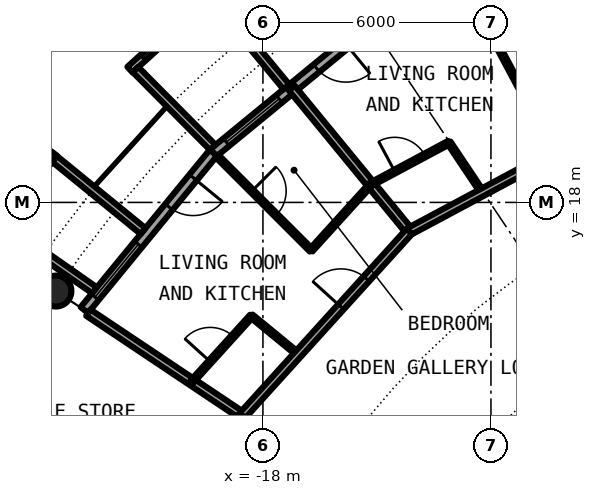
"""IFC4 building model, lengths in metres.
Left out: names, types, materials, properties, quantities, classifications, styles, units other than length and angle.
Written with IfcOpenShell. Run it as: python <this file> out.ifc"""

import sys

from ifc_helpers import new_model, si_unit, direction, frame, frame_2d, origin, origin_2d, place, context, subcontext, project, spatial, rectangle, circle, hollow_circle, extrude, element, fill, save


model = new_model("IFC4")
c1 = context("Model", 3, precision=1e-05, world=origin(), true_north=direction((0.0, 1.0)))
c2 = subcontext(c1, "Body", "Model", "MODEL_VIEW")
j1 = project(units=[si_unit("LENGTHUNIT", "METRE"), si_unit("PLANEANGLEUNIT", "RADIAN")], contexts=[c1])
p1 = place(None, origin())
s1 = spatial("IfcSite", under=j1, at=p1, CompositionType="ELEMENT")
p2 = place(p1, origin())
s2 = spatial("IfcBuilding", under=s1, at=p2, CompositionType="ELEMENT")
p3 = place(p2, frame((0.0, 0.0, 218.8)))
s3 = spatial("IfcBuildingStorey", under=s2, at=p3, CompositionType="ELEMENT", Elevation=218.8)
p4 = place(p3, frame((-23.448, 15.667, 0.0), z_axis=(0.0, 0.0, 1.0), x_axis=(1.0, 0.0, 0.0)))
e1 = element("IfcColumn", 1, at=p4, inside=s3, PredefinedType="COLUMN", context=c2, shape_type="SweptSolid", body=[
    extrude(hollow_circle(Radius=0.406, WallThickness=0.03, at=origin_2d()), origin(), (0.0, 0.0, 1.0), 3.05),
])
p5 = place(p3, frame((-15.167, 22.699, 0.0), z_axis=(0.0, 0.0, 1.0), x_axis=(-0.773019449054, -0.634382322723, 0.0)))
e2 = element("IfcWall", 2, at=p5, inside=s3, PredefinedType="SOLIDWALL", context=c2, shape_type="SweptSolid", body=[
    extrude(rectangle(XDim=5.352, YDim=0.25, at=frame_2d((2.676, 0.0))), origin(), (0.0, 0.0, 1.0), 2.65),
])
p6 = place(p5, frame((0.841, 0.0, 0.0)))
e3 = element("IfcOpeningElement", 3, at=p6, cuts=e2, PredefinedType="OPENING", context=c2, shape_type="SweptSolid", body=[
    extrude(rectangle(XDim=1.0, YDim=2.2, at=frame_2d((0.5, 1.1))), frame((0.0, 0.135, 0.0), z_axis=(0.0, -1.0, 0.0), x_axis=(1.0, 0.0, 0.0)), (0.0, 0.0, 1.0), 0.27),
])
p7 = place(p5, frame((3.111, 0.0, 0.3)))
e4 = element("IfcOpeningElement", 4, at=p7, cuts=e2, PredefinedType="OPENING", context=c2, shape_type="SweptSolid", body=[
    extrude(rectangle(XDim=1.8, YDim=2.1, at=frame_2d((0.9, 1.05))), frame((0.0, 0.135, 0.0), z_axis=(0.0, -1.0, 0.0), x_axis=(1.0, 0.0, 0.0)), (0.0, 0.0, 1.0), 0.27),
])
p8 = place(p3, frame((-19.282, 23.503, -0.03), z_axis=(0.0, 0.0, 1.0), x_axis=(-0.740998365753, -0.671506829416, 0.0)))
e5 = element("IfcWall", 5, at=p8, inside=s3, PredefinedType="SOLIDWALL", context=c2, shape_type="SweptSolid", body=[
    extrude(rectangle(XDim=2.993, YDim=0.2, at=frame_2d((1.497, 0.0))), origin(), (0.0, 0.0, 1.0), 2.68),
])
p9 = place(p8, frame((0.457, 0.0, 0.33)))
e6 = element("IfcOpeningElement", 6, at=p9, cuts=e5, PredefinedType="OPENING", context=c2, shape_type="SweptSolid", body=[
    extrude(circle(Radius=1.04, at=frame_2d((1.04, 1.04))), frame((0.0, 0.11, 0.0), z_axis=(0.0, -1.0, 0.0), x_axis=(1.0, 0.0, 0.0)), (0.0, 0.0, 1.0), 0.22),
])
p10 = place(p3, frame((-17.384, 21.041, -0.03), z_axis=(0.0, 0.0, 1.0), x_axis=(-0.63709551667, 0.770784861449, 0.0)))
e7 = element("IfcWall", 7, at=p10, inside=s3, PredefinedType="SOLIDWALL", context=c2, shape_type="SweptSolid", body=[
    extrude(rectangle(XDim=3.006, YDim=0.2, at=frame_2d((1.503, 0.0))), origin(), (0.0, 0.0, 1.0), 2.68),
])
p11 = place(p3, frame((-19.323, 19.45, -0.03), z_axis=(0.0, 0.0, 1.0), x_axis=(-0.704476739375, 0.709727076896, 0.0)))
e8 = element("IfcWall", 8, at=p11, inside=s3, PredefinedType="SOLIDWALL", context=c2, shape_type="SweptSolid", body=[
    extrude(rectangle(XDim=2.883, YDim=0.2, at=frame_2d((1.441, 0.0))), origin(), (0.0, 0.0, 1.0), 2.68),
])
p12 = place(p3, frame((-19.304, 19.304, 0.0), z_axis=(0.0, 0.0, 1.0), x_axis=(-0.634382322723, -0.773019449054, 0.0)))
e9 = element("IfcWall", 9, at=p12, inside=s3, PredefinedType="SOLIDWALL", context=c2, shape_type="SweptSolid", body=[
    extrude(rectangle(XDim=5.352, YDim=0.25, at=frame_2d((2.676, 0.0))), origin(), (0.0, 0.0, 1.0), 2.65),
])
p13 = place(p12, frame((0.841, 0.0, 0.0)))
e10 = element("IfcOpeningElement", 10, at=p13, cuts=e9, PredefinedType="OPENING", context=c2, shape_type="SweptSolid", body=[
    extrude(rectangle(XDim=1.0, YDim=2.2, at=frame_2d((0.5, 1.1))), frame((0.0, 0.135, 0.0), z_axis=(0.0, -1.0, 0.0), x_axis=(1.0, 0.0, 0.0)), (0.0, 0.0, 1.0), 0.27),
])
p14 = place(p12, frame((3.111, 0.0, 0.3)))
e11 = element("IfcOpeningElement", 11, at=p14, cuts=e9, PredefinedType="OPENING", context=c2, shape_type="SweptSolid", body=[
    extrude(rectangle(XDim=1.8, YDim=2.1, at=frame_2d((0.9, 1.05))), frame((0.0, 0.135, 0.0), z_axis=(0.0, -1.0, 0.0), x_axis=(1.0, 0.0, 0.0)), (0.0, 0.0, 1.0), 0.27),
])
p15 = place(p3, frame((-23.497, 19.289, -0.03), z_axis=(0.0, 0.0, 1.0), x_axis=(-0.602806268067, -0.797887588059, 0.0)))
e12 = element("IfcWall", 12, at=p15, inside=s3, PredefinedType="SOLIDWALL", context=c2, shape_type="SweptSolid", body=[
    extrude(rectangle(XDim=2.447, YDim=0.2, at=frame_2d((1.223, 0.0))), origin(), (0.0, 0.0, 1.0), 2.68),
])
p16 = place(p15, frame((0.183, 0.0, 0.33)))
e13 = element("IfcOpeningElement", 13, at=p16, cuts=e12, PredefinedType="OPENING", context=c2, shape_type="SweptSolid", body=[
    extrude(circle(Radius=1.04, at=frame_2d((1.04, 1.04))), frame((0.0, 0.11, 0.0), z_axis=(0.0, -1.0, 0.0), x_axis=(1.0, 0.0, 0.0)), (0.0, 0.0, 1.0), 0.22),
])
p17 = place(p3, frame((-21.155, 17.246, -0.03), z_axis=(0.0, 0.0, 1.0), x_axis=(-0.775179004516, 0.631741648902, 0.0)))
e14 = element("IfcWall", 14, at=p17, inside=s3, PredefinedType="SOLIDWALL", context=c2, shape_type="SweptSolid", body=[
    extrude(rectangle(XDim=3.006, YDim=0.2, at=frame_2d((1.503, 0.0))), origin(), (0.0, 0.0, 1.0), 2.68),
])
p18 = place(p3, frame((-22.433, 15.688, -0.03), z_axis=(0.0, 0.0, 1.0), x_axis=(-0.819373043115, 0.573260687834, 0.0)))
e15 = element("IfcWall", 15, at=p18, inside=s3, PredefinedType="SOLIDWALL", context=c2, shape_type="SweptSolid", body=[
    extrude(rectangle(XDim=2.925, YDim=0.2, at=frame_2d((1.463, 0.0))), origin(), (0.0, 0.0, 1.0), 2.68),
])
p19 = place(p3, frame((-22.595, 15.098, 0.0), z_axis=(0.0, 0.0, 1.0), x_axis=(0.831387096605, -0.55569370664, 0.0)))
e16 = element("IfcWall", 16, at=p19, inside=s3, PredefinedType="PARTITIONING", context=c2, shape_type="SweptSolid", body=[
    extrude(rectangle(XDim=4.875, YDim=0.2, at=frame_2d((2.438, 0.0))), origin(), (0.0, 0.0, 1.0), 2.65),
])
p20 = place(p3, frame((-19.21, 19.222, 0.0), z_axis=(0.0, 0.0, 1.0), x_axis=(0.706967463531, -0.707246071398, 0.0)))
e17 = element("IfcWall", 17, at=p20, inside=s3, PredefinedType="PARTITIONING", context=c2, shape_type="SweptSolid", body=[
    extrude(rectangle(XDim=3.505, YDim=0.1, at=frame_2d((1.752, 0.0))), origin(), (0.0, 0.0, 1.0), 2.65),
])
p21 = place(p20, frame((1.303, 0.0, 0.0)))
e18 = element("IfcOpeningElement", 18, at=p21, cuts=e17, PredefinedType="OPENING", context=c2, shape_type="SweptSolid", body=[
    extrude(rectangle(XDim=0.9, YDim=2.3, at=frame_2d((0.45, 1.15))), frame((0.0, 0.06, 0.0), z_axis=(0.0, -1.0, 0.0), x_axis=(1.0, 0.0, 0.0)), (0.0, 0.0, 1.0), 0.12),
])
p22 = place(p3, frame((-17.24, 21.007, 0.0), z_axis=(0.0, 0.0, 1.0), x_axis=(0.634374159378, -0.773026148273, 0.0)))
e19 = element("IfcWall", 19, at=p22, inside=s3, PredefinedType="PARTITIONING", context=c2, shape_type="SweptSolid", body=[
    extrude(rectangle(XDim=4.876, YDim=0.2, at=frame_2d((2.438, 0.0))), origin(), (0.0, 0.0, 1.0), 2.65),
])
p23 = place(p3, frame((-13.106, 19.574, 0.0), z_axis=(0.0, 0.0, 1.0), x_axis=(0.556271671389, -0.83100049796, 0.0)))
e20 = element("IfcWall", 20, at=p23, inside=s3, PredefinedType="PARTITIONING", context=c2, shape_type="SweptSolid", body=[
    extrude(rectangle(XDim=1.576, YDim=0.1, at=frame_2d((0.788, 0.0))), origin(), (0.0, 0.0, 1.0), 2.65),
])
p24 = place(p3, frame((-12.81, 23.966, 0.0), z_axis=(0.0, 0.0, 1.0), x_axis=(0.471372010014, -0.881934480659, 0.0)))
e21 = element("IfcWall", 21, at=p24, inside=s3, PredefinedType="PARTITIONING", context=c2, shape_type="SweptSolid", body=[
    extrude(rectangle(XDim=3.734, YDim=0.1, at=frame_2d((1.867, 0.0))), origin(), (0.0, 0.0, 1.0), 2.65),
])
p25 = place(p24, frame((1.417, 0.0, 0.0)))
e22 = element("IfcOpeningElement", 22, at=p25, cuts=e21, PredefinedType="OPENING", context=c2, shape_type="SweptSolid", body=[
    extrude(rectangle(XDim=0.9, YDim=2.3, at=frame_2d((0.45, 1.15))), frame((0.0, 0.06, 0.0), z_axis=(0.0, -1.0, 0.0), x_axis=(1.0, 0.0, 0.0)), (0.0, 0.0, 1.0), 0.12),
])
p26 = place(p3, frame((-18.302, 15.01, 0.0), z_axis=(0.0, 0.0, 1.0), x_axis=(0.773476341377, -0.633825172528, 0.0)))
e23 = element("IfcWall", 23, at=p26, inside=s3, PredefinedType="PARTITIONING", context=c2, shape_type="SweptSolid", body=[
    extrude(rectangle(XDim=1.584, YDim=0.1, at=frame_2d((0.792, 0.0))), origin(), (0.0, 0.0, 1.0), 2.65),
])
p27 = place(p3, frame((-14.718, 9.832, 0.0), z_axis=(0.0, 0.0, 1.0), x_axis=(0.831437137577, 0.555618831806, 0.0)))
e24 = element("IfcWall", 24, at=p27, inside=s3, PredefinedType="PARTITIONING", context=c2, shape_type="SweptSolid", body=[
    extrude(rectangle(XDim=13.549, YDim=0.2, at=frame_2d((6.774, 0.0))), origin(), (0.0, 0.0, 1.0), 2.65),
])
p28 = place(p27, frame((7.968, 0.0, 0.0)))
e25 = element("IfcOpeningElement", 25, at=p28, cuts=e24, PredefinedType="OPENING", context=c2, shape_type="SweptSolid", body=[
    extrude(rectangle(XDim=1.0, YDim=2.3, at=frame_2d((0.5, 1.15))), frame((0.0, 0.11, 0.0), z_axis=(0.0, -1.0, 0.0), x_axis=(1.0, 0.0, 0.0)), (0.0, 0.0, 1.0), 0.22),
])
p29 = place(p3, frame((-14.147, 17.238, 0.0), z_axis=(0.0, 0.0, 1.0), x_axis=(0.881912965532, 0.471412262491, 0.0)))
e26 = element("IfcWall", 26, at=p29, inside=s3, PredefinedType="PARTITIONING", context=c2, shape_type="SweptSolid", body=[
    extrude(rectangle(XDim=8.702, YDim=0.2, at=frame_2d((4.351, 0.0))), origin(), (0.0, 0.0, 1.0), 2.65),
])
p30 = place(p29, frame((4.937, 0.0, 0.0)))
e27 = element("IfcOpeningElement", 27, at=p30, cuts=e26, PredefinedType="OPENING", context=c2, shape_type="SweptSolid", body=[
    extrude(rectangle(XDim=1.0, YDim=2.3, at=frame_2d((0.5, 1.15))), frame((0.0, 0.11, 0.0), z_axis=(0.0, -1.0, 0.0), x_axis=(1.0, 0.0, 0.0)), (0.0, 0.0, 1.0), 0.22),
])
p31 = place(p3, frame((-18.542, 12.389, 0.0), z_axis=(0.0, 0.0, 1.0), x_axis=(0.671561669125, 0.740948665268, 0.0)))
e28 = element("IfcWall", 28, at=p31, inside=s3, PredefinedType="PARTITIONING", context=c2, shape_type="SweptSolid", body=[
    extrude(rectangle(XDim=6.544, YDim=0.2, at=frame_2d((3.272, 0.0))), origin(), (0.0, 0.0, 1.0), 2.65),
])
p32 = place(p31, frame((3.862, 0.0, 0.0)))
e29 = element("IfcOpeningElement", 29, at=p32, cuts=e28, PredefinedType="OPENING", context=c2, shape_type="SweptSolid", body=[
    extrude(rectangle(XDim=1.0, YDim=2.3, at=frame_2d((0.5, 1.15))), frame((0.0, 0.11, 0.0), z_axis=(0.0, -1.0, 0.0), x_axis=(1.0, 0.0, 0.0)), (0.0, 0.0, 1.0), 0.22),
])
p33 = place(p3, frame((-19.317, 10.915, 0.0), z_axis=(0.0, 0.0, 1.0), x_axis=(0.465359652486, 0.885121683068, 0.0)))
e30 = element("IfcWall", 30, at=p33, inside=s3, PredefinedType="PARTITIONING", context=c2, shape_type="SweptSolid", body=[
    extrude(rectangle(XDim=1.665, YDim=0.2, at=frame_2d((0.833, 0.0))), origin(), (0.0, 0.0, 1.0), 2.65),
])
p34 = place(p3, frame((-15.162, 18.475, 0.0), z_axis=(0.0, 0.0, 1.0), x_axis=(0.881949682246, 0.471343566824, 0.0)))
e31 = element("IfcWall", 31, at=p34, inside=s3, PredefinedType="PARTITIONING", context=c2, shape_type="SweptSolid", body=[
    extrude(rectangle(XDim=2.331, YDim=0.1, at=frame_2d((1.166, 0.0))), origin(), (0.0, 0.0, 1.0), 2.65),
])
p35 = place(p34, frame((0.716, 0.0, 0.0)))
e32 = element("IfcOpeningElement", 32, at=p35, cuts=e31, PredefinedType="OPENING", context=c2, shape_type="SweptSolid", body=[
    extrude(rectangle(XDim=0.9, YDim=2.3, at=frame_2d((0.45, 1.15))), frame((0.0, 0.06, 0.0), z_axis=(0.0, -1.0, 0.0), x_axis=(1.0, 0.0, 0.0)), (0.0, 0.0, 1.0), 0.12),
])
p36 = place(p3, frame((-19.872, 13.278, 0.0), z_axis=(0.0, 0.0, 1.0), x_axis=(0.671637685376, 0.740879760544, 0.0)))
e33 = element("IfcWall", 33, at=p36, inside=s3, PredefinedType="PARTITIONING", context=c2, shape_type="SweptSolid", body=[
    extrude(rectangle(XDim=2.338, YDim=0.1, at=frame_2d((1.169, 0.0))), origin(), (0.0, 0.0, 1.0), 2.65),
])
p37 = place(p36, frame((0.719, 0.0, 0.0)))
e34 = element("IfcOpeningElement", 34, at=p37, cuts=e33, PredefinedType="OPENING", context=c2, shape_type="SweptSolid", body=[
    extrude(rectangle(XDim=0.9, YDim=2.3, at=frame_2d((0.45, 1.15))), frame((0.0, 0.06, 0.0), z_axis=(0.0, -1.0, 0.0), x_axis=(1.0, 0.0, 0.0)), (0.0, 0.0, 1.0), 0.12),
])
p38 = place(p3, frame((-16.732, 16.743, 0.0), z_axis=(0.0, 0.0, 1.0), x_axis=(0.671528384412, 0.740978831634, 0.0)))
e35 = element("IfcWall", 35, at=p38, inside=s3, PredefinedType="PARTITIONING", context=c2, shape_type="SweptSolid", body=[
    extrude(rectangle(XDim=2.338, YDim=0.1, at=frame_2d((1.169, 0.0))), origin(), (0.0, 0.0, 1.0), 2.65),
])
p39 = place(p6, origin())
e36 = element("IfcDoor", 36, at=p39, inside=s3, OperationType="SINGLE_SWING_LEFT", PredefinedType="DOOR", context=c2, shape_type="SweptSolid", body=[
    extrude(rectangle(XDim=1.0, YDim=2.2, at=frame_2d((0.5, 1.1))), frame((0.0, 0.025, 0.0), z_axis=(0.0, -1.0, 0.0), x_axis=(1.0, 0.0, 0.0)), (0.0, 0.0, 1.0), 0.05),
])
fill(e3, e36)
p40 = place(p7, origin())
e37 = element("IfcWindow", 37, at=p40, inside=s3, PartitioningType="SINGLE_PANEL", PredefinedType="WINDOW", context=c2, shape_type="SweptSolid", body=[
    extrude(rectangle(XDim=1.8, YDim=2.1, at=frame_2d((0.9, 1.05))), frame((0.0, 0.03, 0.0), z_axis=(0.0, -1.0, 0.0), x_axis=(1.0, 0.0, 0.0)), (0.0, 0.0, 1.0), 0.06),
])
fill(e4, e37)
p41 = place(p9, origin())
e38 = element("IfcWindow", 38, at=p41, inside=s3, PartitioningType="SINGLE_PANEL", PredefinedType="WINDOW", context=c2, shape_type="SweptSolid", body=[
    extrude(circle(Radius=1.04, at=frame_2d((1.04, 1.04))), frame((0.0, 0.03, 0.0), z_axis=(0.0, -1.0, 0.0), x_axis=(1.0, 0.0, 0.0)), (0.0, 0.0, 1.0), 0.06),
])
fill(e6, e38)
p42 = place(p13, origin())
e39 = element("IfcDoor", 39, at=p42, inside=s3, OperationType="SINGLE_SWING_LEFT", PredefinedType="DOOR", context=c2, shape_type="SweptSolid", body=[
    extrude(rectangle(XDim=1.0, YDim=2.2, at=frame_2d((0.5, 1.1))), frame((0.0, 0.025, 0.0), z_axis=(0.0, -1.0, 0.0), x_axis=(1.0, 0.0, 0.0)), (0.0, 0.0, 1.0), 0.05),
])
fill(e10, e39)
p43 = place(p14, origin())
e40 = element("IfcWindow", 40, at=p43, inside=s3, PartitioningType="SINGLE_PANEL", PredefinedType="WINDOW", context=c2, shape_type="SweptSolid", body=[
    extrude(rectangle(XDim=1.8, YDim=2.1, at=frame_2d((0.9, 1.05))), frame((0.0, 0.03, 0.0), z_axis=(0.0, -1.0, 0.0), x_axis=(1.0, 0.0, 0.0)), (0.0, 0.0, 1.0), 0.06),
])
fill(e11, e40)
p44 = place(p35, origin())
e41 = element("IfcDoor", 41, at=p44, inside=s3, OperationType="SINGLE_SWING_LEFT", PredefinedType="DOOR", context=c2, shape_type="SweptSolid", body=[
    extrude(rectangle(XDim=0.9, YDim=2.3, at=frame_2d((0.45, 1.15))), frame((0.0, 0.025, 0.0), z_axis=(0.0, -1.0, 0.0), x_axis=(1.0, 0.0, 0.0)), (0.0, 0.0, 1.0), 0.05),
])
fill(e32, e41)
p45 = place(p25, origin())
e42 = element("IfcDoor", 42, at=p45, inside=s3, OperationType="SINGLE_SWING_RIGHT", PredefinedType="DOOR", context=c2, shape_type="SweptSolid", body=[
    extrude(rectangle(XDim=0.9, YDim=2.3, at=frame_2d((0.45, 1.15))), frame((0.0, 0.025, 0.0), z_axis=(0.0, -1.0, 0.0), x_axis=(1.0, 0.0, 0.0)), (0.0, 0.0, 1.0), 0.05),
])
fill(e22, e42)
p46 = place(p32, origin())
e43 = element("IfcDoor", 43, at=p46, inside=s3, OperationType="SINGLE_SWING_RIGHT", PredefinedType="DOOR", context=c2, shape_type="SweptSolid", body=[
    extrude(rectangle(XDim=1.0, YDim=2.3, at=frame_2d((0.5, 1.15))), frame((0.0, 0.025, 0.0), z_axis=(0.0, -1.0, 0.0), x_axis=(1.0, 0.0, 0.0)), (0.0, 0.0, 1.0), 0.05),
])
fill(e29, e43)
p47 = place(p37, origin())
e44 = element("IfcDoor", 44, at=p47, inside=s3, OperationType="SINGLE_SWING_LEFT", PredefinedType="DOOR", context=c2, shape_type="SweptSolid", body=[
    extrude(rectangle(XDim=0.9, YDim=2.3, at=frame_2d((0.45, 1.15))), frame((0.0, 0.025, 0.0), z_axis=(0.0, -1.0, 0.0), x_axis=(1.0, 0.0, 0.0)), (0.0, 0.0, 1.0), 0.05),
])
fill(e34, e44)
p48 = place(p21, origin())
e45 = element("IfcDoor", 45, at=p48, inside=s3, OperationType="SINGLE_SWING_LEFT", PredefinedType="DOOR", context=c2, shape_type="SweptSolid", body=[
    extrude(rectangle(XDim=0.9, YDim=2.3, at=frame_2d((0.45, 1.15))), frame((0.0, 0.025, 0.0), z_axis=(0.0, -1.0, 0.0), x_axis=(1.0, 0.0, 0.0)), (0.0, 0.0, 1.0), 0.05),
])
fill(e18, e45)
save(model, sys.argv[1])
